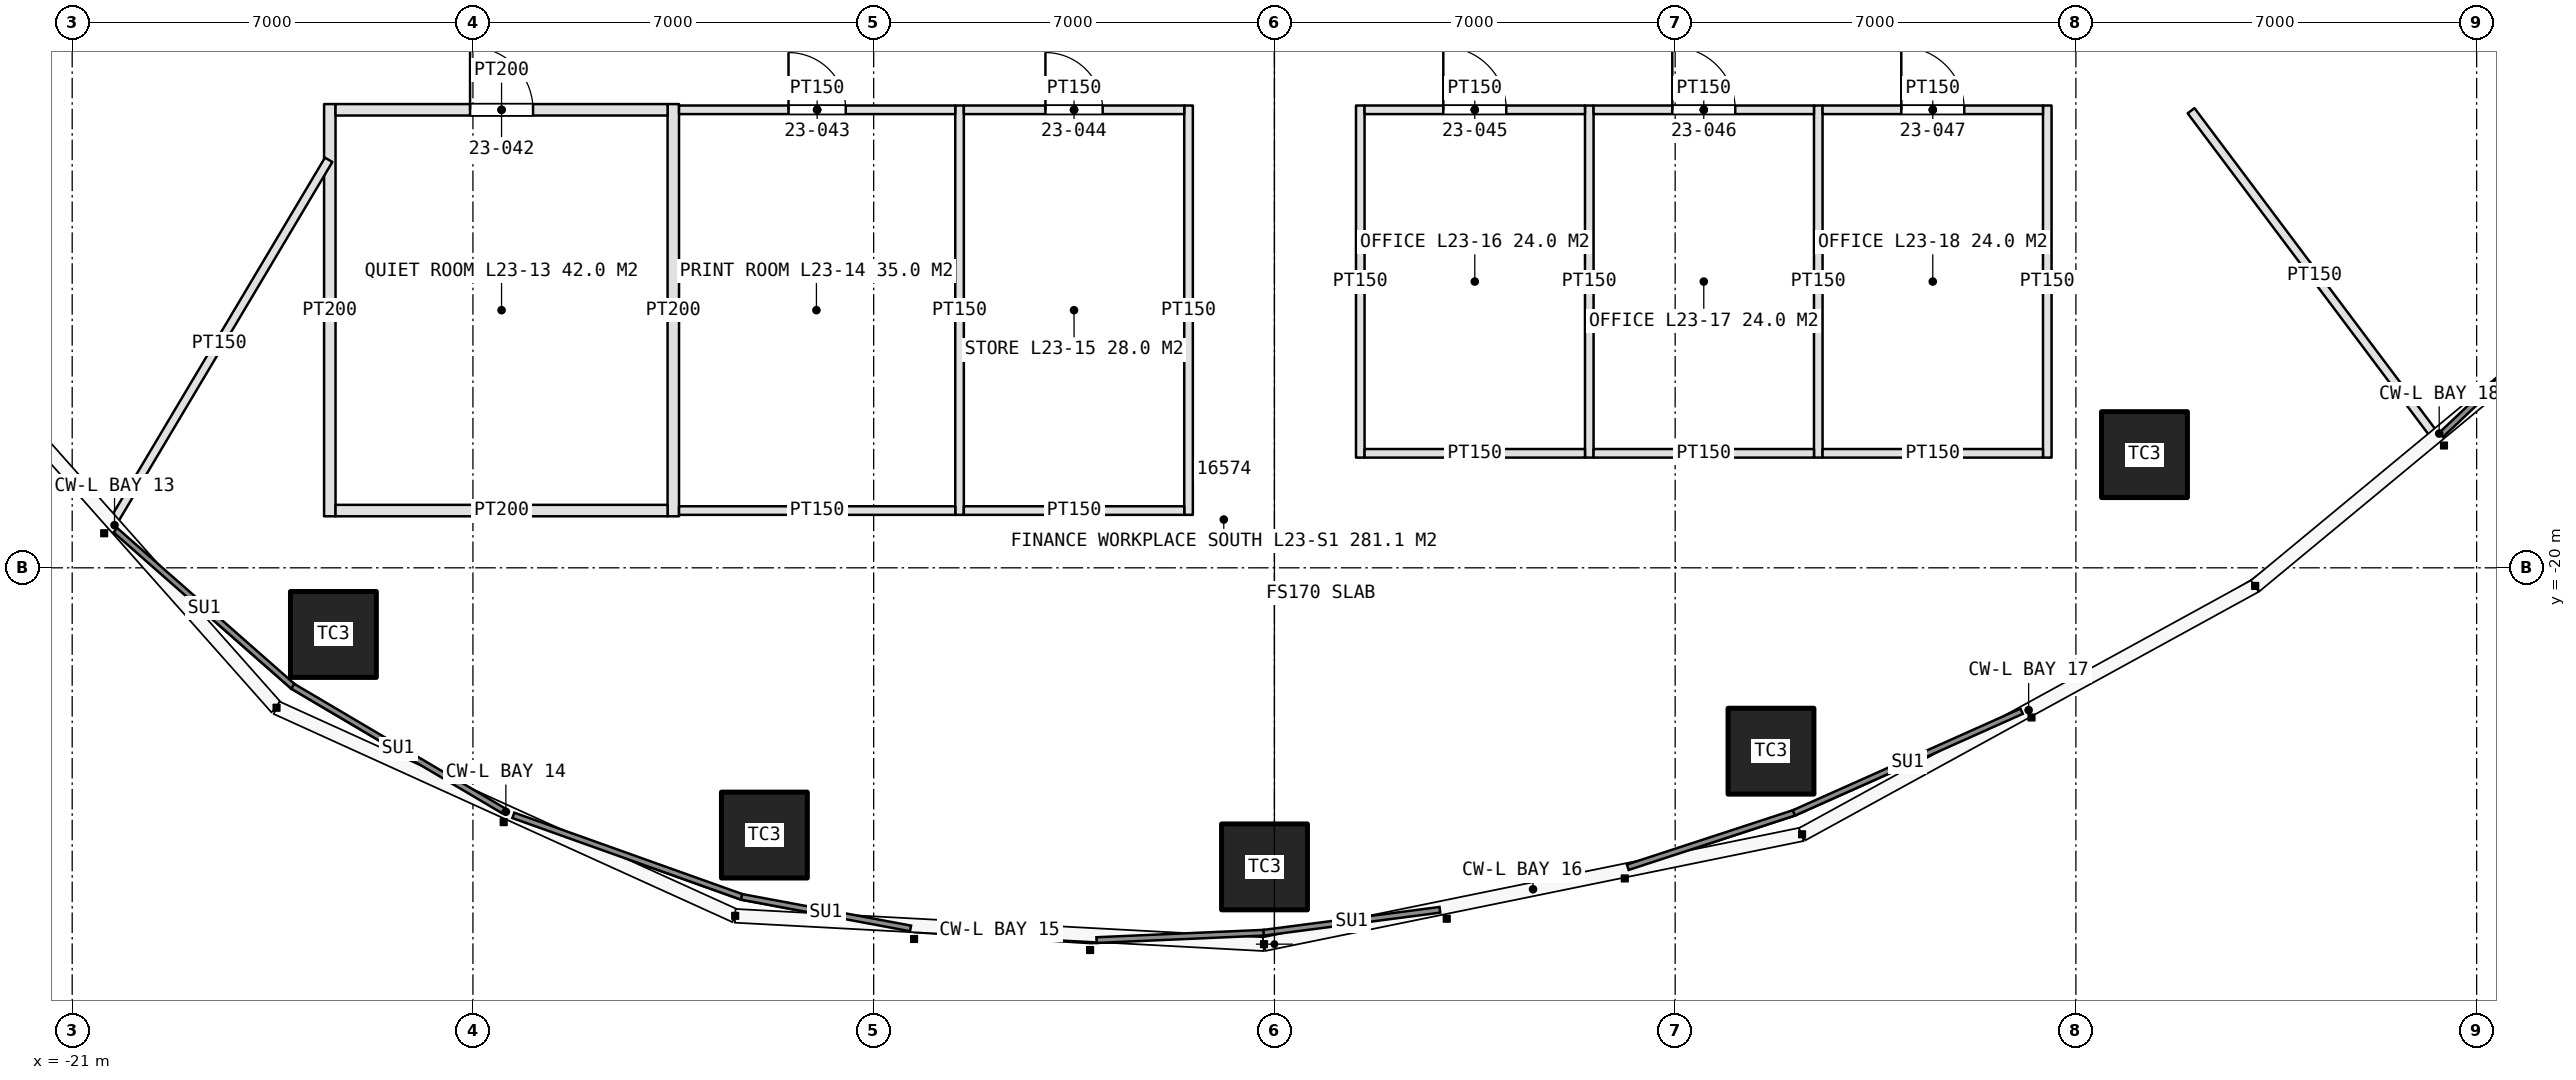
"""IFC4 building model, lengths in metres.
Left out: names, types, materials, properties, quantities, classifications, styles, units other than length and angle.
Written with IfcOpenShell. Run it as: python <this file> out.ifc"""

import sys

from ifc_helpers import new_model, si_unit, direction, frame, frame_2d, origin, origin_2d, place, context, subcontext, project, spatial, rectangle, extrude, element, fill, save


model = new_model("IFC4")
c1 = context("Model", 3, precision=1e-05, world=origin(), true_north=direction((0.0, 1.0)))
c2 = subcontext(c1, "Body", "Model", "MODEL_VIEW")
j1 = project(units=[si_unit("LENGTHUNIT", "METRE"), si_unit("PLANEANGLEUNIT", "RADIAN")], contexts=[c1])
p1 = place(None, origin())
s1 = spatial("IfcSite", under=j1, at=p1, CompositionType="ELEMENT")
p2 = place(p1, origin())
s2 = spatial("IfcBuilding", under=s1, at=p2, CompositionType="ELEMENT")
p3 = place(p2, frame((0.0, 0.0, 113.4)))
s3 = spatial("IfcBuildingStorey", under=s2, at=p3, CompositionType="ELEMENT", Elevation=113.4)
for number, where, z_axis, x_axis in (
    (1, (-16.437, -21.164, 0.0), (0.0, 0.0, 1.0), (1.0, 0.0, 0.0)),
    (2, (-8.909, -24.668, 0.0), (0.0, 0.0, 1.0), (1.0, 0.0, 0.0)),
    (3, (-0.173, -25.224, 0.0), (0.0, 0.0, 1.0), (1.0, 0.0, 0.0)),
    (4, (8.674, -23.203, 0.0), (0.0, 0.0, 1.0), (1.0, 0.0, 0.0)),
    (5, (15.198, -18.023, 0.0), (0.0, 0.0, 1.0), (1.0, 0.0, 0.0)),
):
    element("IfcColumn", number, at=place(p3, frame(where, z_axis=z_axis, x_axis=x_axis)), inside=s3, PredefinedType="COLUMN", context=c2, shape_type="SweptSolid", body=[
        extrude(rectangle(XDim=1.5, YDim=1.5, at=origin_2d()), origin(), (0.0, 0.0, 1.0), 4.2),
    ])
for number, where, z_axis, x_axis in (
    (6, (-16.5, -11.9, 0.0), (0.0, 0.0, 1.0), (0.0, -1.0, 0.0)),
    (7, (-10.5, -11.9, 0.0), (0.0, 0.0, 1.0), (0.0, -1.0, 0.0)),
):
    element("IfcWall", number, at=place(p3, frame(where, z_axis=z_axis, x_axis=x_axis)), inside=s3, PredefinedType="PARTITIONING", context=c2, shape_type="SweptSolid", body=[
        extrude(rectangle(XDim=7.2, YDim=0.2, at=frame_2d((3.6, 0.0))), origin(), (0.0, 0.0, 1.0), 3.0),
    ])
for number, where, z_axis, x_axis in (
    (8, (-5.5, -11.925, 0.0), (0.0, 0.0, 1.0), (0.0, -1.0, 0.0)),
    (9, (-1.5, -11.925, 0.0), (0.0, 0.0, 1.0), (0.0, -1.0, 0.0)),
):
    element("IfcWall", number, at=place(p3, frame(where, z_axis=z_axis, x_axis=x_axis)), inside=s3, PredefinedType="PARTITIONING", context=c2, shape_type="SweptSolid", body=[
        extrude(rectangle(XDim=7.15, YDim=0.15, at=frame_2d((3.575, 0.0))), origin(), (0.0, 0.0, 1.0), 3.0),
    ])
p4 = place(p3, frame((-16.4, -12.0, 0.0), z_axis=(0.0, 0.0, 1.0), x_axis=(1.0, 0.0, 0.0)))
e10 = element("IfcWall", 10, at=p4, inside=s3, PredefinedType="PARTITIONING", context=c2, shape_type="SweptSolid", body=[
    extrude(rectangle(XDim=5.8, YDim=0.2, at=frame_2d((2.9, 0.0))), origin(), (0.0, 0.0, 1.0), 3.0),
])
p5 = place(p4, frame((2.35, 0.0, 0.0)))
e11 = element("IfcOpeningElement", 11, at=p5, cuts=e10, PredefinedType="OPENING", context=c2, shape_type="SweptSolid", body=[
    extrude(rectangle(XDim=1.1, YDim=2.3, at=frame_2d((0.55, 1.15))), frame((0.0, 0.11, 0.0), z_axis=(0.0, -1.0, 0.0), x_axis=(1.0, 0.0, 0.0)), (0.0, 0.0, 1.0), 0.22),
])
p6 = place(p3, frame((-16.4, -19.0, 0.0), z_axis=(0.0, 0.0, 1.0), x_axis=(1.0, 0.0, 0.0)))
e12 = element("IfcWall", 12, at=p6, inside=s3, PredefinedType="PARTITIONING", context=c2, shape_type="SweptSolid", body=[
    extrude(rectangle(XDim=5.8, YDim=0.2, at=frame_2d((2.9, 0.0))), origin(), (0.0, 0.0, 1.0), 3.0),
])
p7 = place(p3, frame((-10.4, -12.0, 0.0), z_axis=(0.0, 0.0, 1.0), x_axis=(1.0, 0.0, 0.0)))
e13 = element("IfcWall", 13, at=p7, inside=s3, PredefinedType="PARTITIONING", context=c2, shape_type="SweptSolid", body=[
    extrude(rectangle(XDim=4.825, YDim=0.15, at=frame_2d((2.413, 0.0))), origin(), (0.0, 0.0, 1.0), 3.0),
])
p8 = place(p7, frame((1.913, 0.0, 0.0)))
e14 = element("IfcOpeningElement", 14, at=p8, cuts=e13, PredefinedType="OPENING", context=c2, shape_type="SweptSolid", body=[
    extrude(rectangle(XDim=1.0, YDim=2.2, at=frame_2d((0.5, 1.1))), frame((0.0, 0.085, 0.0), z_axis=(0.0, -1.0, 0.0), x_axis=(1.0, 0.0, 0.0)), (0.0, 0.0, 1.0), 0.17),
])
p9 = place(p3, frame((-10.4, -19.0, 0.0), z_axis=(0.0, 0.0, 1.0), x_axis=(1.0, 0.0, 0.0)))
e15 = element("IfcWall", 15, at=p9, inside=s3, PredefinedType="PARTITIONING", context=c2, shape_type="SweptSolid", body=[
    extrude(rectangle(XDim=4.825, YDim=0.15, at=frame_2d((2.413, 0.0))), origin(), (0.0, 0.0, 1.0), 3.0),
])
p10 = place(p3, frame((-5.425, -12.0, 0.0), z_axis=(0.0, 0.0, 1.0), x_axis=(1.0, 0.0, 0.0)))
e16 = element("IfcWall", 16, at=p10, inside=s3, PredefinedType="PARTITIONING", context=c2, shape_type="SweptSolid", body=[
    extrude(rectangle(XDim=3.85, YDim=0.15, at=frame_2d((1.925, 0.0))), origin(), (0.0, 0.0, 1.0), 3.0),
])
p11 = place(p10, frame((1.425, 0.0, 0.0)))
e17 = element("IfcOpeningElement", 17, at=p11, cuts=e16, PredefinedType="OPENING", context=c2, shape_type="SweptSolid", body=[
    extrude(rectangle(XDim=1.0, YDim=2.2, at=frame_2d((0.5, 1.1))), frame((0.0, 0.085, 0.0), z_axis=(0.0, -1.0, 0.0), x_axis=(1.0, 0.0, 0.0)), (0.0, 0.0, 1.0), 0.17),
])
p12 = place(p3, frame((-5.425, -19.0, 0.0), z_axis=(0.0, 0.0, 1.0), x_axis=(1.0, 0.0, 0.0)))
e18 = element("IfcWall", 18, at=p12, inside=s3, PredefinedType="PARTITIONING", context=c2, shape_type="SweptSolid", body=[
    extrude(rectangle(XDim=3.85, YDim=0.15, at=frame_2d((1.925, 0.0))), origin(), (0.0, 0.0, 1.0), 3.0),
])
for number, where, z_axis, x_axis in (
    (19, (1.5, -11.925, 0.0), (0.0, 0.0, 1.0), (0.0, -1.0, 0.0)),
    (20, (5.5, -11.925, 0.0), (0.0, 0.0, 1.0), (0.0, -1.0, 0.0)),
    (21, (9.5, -11.925, 0.0), (0.0, 0.0, 1.0), (0.0, -1.0, 0.0)),
    (22, (13.5, -11.925, 0.0), (0.0, 0.0, 1.0), (0.0, -1.0, 0.0)),
):
    element("IfcWall", number, at=place(p3, frame(where, z_axis=z_axis, x_axis=x_axis)), inside=s3, PredefinedType="PARTITIONING", context=c2, shape_type="SweptSolid", body=[
        extrude(rectangle(XDim=6.15, YDim=0.15, at=frame_2d((3.075, 0.0))), origin(), (0.0, 0.0, 1.0), 3.0),
    ])
p13 = place(p3, frame((1.575, -12.0, 0.0), z_axis=(0.0, 0.0, 1.0), x_axis=(1.0, 0.0, 0.0)))
e23 = element("IfcWall", 23, at=p13, inside=s3, PredefinedType="PARTITIONING", context=c2, shape_type="SweptSolid", body=[
    extrude(rectangle(XDim=3.85, YDim=0.15, at=frame_2d((1.925, 0.0))), origin(), (0.0, 0.0, 1.0), 3.0),
])
p14 = place(p13, frame((1.375, 0.0, 0.0)))
e24 = element("IfcOpeningElement", 24, at=p14, cuts=e23, PredefinedType="OPENING", context=c2, shape_type="SweptSolid", body=[
    extrude(rectangle(XDim=1.1, YDim=2.3, at=frame_2d((0.55, 1.15))), frame((0.0, 0.085, 0.0), z_axis=(0.0, -1.0, 0.0), x_axis=(1.0, 0.0, 0.0)), (0.0, 0.0, 1.0), 0.17),
])
p15 = place(p3, frame((1.575, -18.0, 0.0), z_axis=(0.0, 0.0, 1.0), x_axis=(1.0, 0.0, 0.0)))
e25 = element("IfcWall", 25, at=p15, inside=s3, PredefinedType="PARTITIONING", context=c2, shape_type="SweptSolid", body=[
    extrude(rectangle(XDim=3.85, YDim=0.15, at=frame_2d((1.925, 0.0))), origin(), (0.0, 0.0, 1.0), 3.0),
])
p16 = place(p3, frame((5.575, -12.0, 0.0), z_axis=(0.0, 0.0, 1.0), x_axis=(1.0, 0.0, 0.0)))
e26 = element("IfcWall", 26, at=p16, inside=s3, PredefinedType="PARTITIONING", context=c2, shape_type="SweptSolid", body=[
    extrude(rectangle(XDim=3.85, YDim=0.15, at=frame_2d((1.925, 0.0))), origin(), (0.0, 0.0, 1.0), 3.0),
])
p17 = place(p16, frame((1.375, 0.0, 0.0)))
e27 = element("IfcOpeningElement", 27, at=p17, cuts=e26, PredefinedType="OPENING", context=c2, shape_type="SweptSolid", body=[
    extrude(rectangle(XDim=1.1, YDim=2.3, at=frame_2d((0.55, 1.15))), frame((0.0, 0.085, 0.0), z_axis=(0.0, -1.0, 0.0), x_axis=(1.0, 0.0, 0.0)), (0.0, 0.0, 1.0), 0.17),
])
p18 = place(p3, frame((5.575, -18.0, 0.0), z_axis=(0.0, 0.0, 1.0), x_axis=(1.0, 0.0, 0.0)))
e28 = element("IfcWall", 28, at=p18, inside=s3, PredefinedType="PARTITIONING", context=c2, shape_type="SweptSolid", body=[
    extrude(rectangle(XDim=3.85, YDim=0.15, at=frame_2d((1.925, 0.0))), origin(), (0.0, 0.0, 1.0), 3.0),
])
p19 = place(p3, frame((9.575, -12.0, 0.0), z_axis=(0.0, 0.0, 1.0), x_axis=(1.0, 0.0, 0.0)))
e29 = element("IfcWall", 29, at=p19, inside=s3, PredefinedType="PARTITIONING", context=c2, shape_type="SweptSolid", body=[
    extrude(rectangle(XDim=3.85, YDim=0.15, at=frame_2d((1.925, 0.0))), origin(), (0.0, 0.0, 1.0), 3.0),
])
p20 = place(p19, frame((1.375, 0.0, 0.0)))
e30 = element("IfcOpeningElement", 30, at=p20, cuts=e29, PredefinedType="OPENING", context=c2, shape_type="SweptSolid", body=[
    extrude(rectangle(XDim=1.1, YDim=2.3, at=frame_2d((0.55, 1.15))), frame((0.0, 0.085, 0.0), z_axis=(0.0, -1.0, 0.0), x_axis=(1.0, 0.0, 0.0)), (0.0, 0.0, 1.0), 0.17),
])
p21 = place(p3, frame((9.575, -18.0, 0.0), z_axis=(0.0, 0.0, 1.0), x_axis=(1.0, 0.0, 0.0)))
e31 = element("IfcWall", 31, at=p21, inside=s3, PredefinedType="PARTITIONING", context=c2, shape_type="SweptSolid", body=[
    extrude(rectangle(XDim=3.85, YDim=0.15, at=frame_2d((1.925, 0.0))), origin(), (0.0, 0.0, 1.0), 3.0),
])
p22 = place(p3, frame((-16.52, -12.874, 0.0), z_axis=(0.0, 0.0, 1.0), x_axis=(-0.511514296511, -0.85927476657, 0.0)))
e32 = element("IfcWall", 32, at=p22, inside=s3, PredefinedType="PARTITIONING", context=c2, shape_type="SweptSolid", body=[
    extrude(rectangle(XDim=7.474, YDim=0.15, at=frame_2d((3.737, 0.0))), origin(), (0.0, 0.0, 1.0), 3.0),
])
p23 = place(p3, frame((16.012, -12.016, 0.0), z_axis=(0.0, 0.0, 1.0), x_axis=(0.600059749679, -0.799955184254, 0.0)))
e33 = element("IfcWall", 33, at=p23, inside=s3, PredefinedType="PARTITIONING", context=c2, shape_type="SweptSolid", body=[
    extrude(rectangle(XDim=7.191, YDim=0.15, at=frame_2d((3.596, 0.0))), origin(), (0.0, 0.0, 1.0), 3.0),
])
p24 = place(p5, origin())
e34 = element("IfcDoor", 34, at=p24, inside=s3, OperationType="SINGLE_SWING_LEFT", PredefinedType="DOOR", context=c2, shape_type="SweptSolid", body=[
    extrude(rectangle(XDim=1.1, YDim=2.3, at=frame_2d((0.55, 1.15))), frame((0.0, 0.025, 0.0), z_axis=(0.0, -1.0, 0.0), x_axis=(1.0, 0.0, 0.0)), (0.0, 0.0, 1.0), 0.05),
])
fill(e11, e34)
p25 = place(p8, origin())
e35 = element("IfcDoor", 35, at=p25, inside=s3, OperationType="SINGLE_SWING_LEFT", PredefinedType="DOOR", context=c2, shape_type="SweptSolid", body=[
    extrude(rectangle(XDim=1.0, YDim=2.2, at=frame_2d((0.5, 1.1))), frame((0.0, 0.025, 0.0), z_axis=(0.0, -1.0, 0.0), x_axis=(1.0, 0.0, 0.0)), (0.0, 0.0, 1.0), 0.05),
])
fill(e14, e35)
p26 = place(p11, origin())
e36 = element("IfcDoor", 36, at=p26, inside=s3, OperationType="SINGLE_SWING_LEFT", PredefinedType="DOOR", context=c2, shape_type="SweptSolid", body=[
    extrude(rectangle(XDim=1.0, YDim=2.2, at=frame_2d((0.5, 1.1))), frame((0.0, 0.025, 0.0), z_axis=(0.0, -1.0, 0.0), x_axis=(1.0, 0.0, 0.0)), (0.0, 0.0, 1.0), 0.05),
])
fill(e17, e36)
p27 = place(p14, origin())
e37 = element("IfcDoor", 37, at=p27, inside=s3, OperationType="SINGLE_SWING_LEFT", PredefinedType="DOOR", context=c2, shape_type="SweptSolid", body=[
    extrude(rectangle(XDim=1.1, YDim=2.3, at=frame_2d((0.55, 1.15))), frame((0.0, 0.025, 0.0), z_axis=(0.0, -1.0, 0.0), x_axis=(1.0, 0.0, 0.0)), (0.0, 0.0, 1.0), 0.05),
])
fill(e24, e37)
p28 = place(p17, origin())
e38 = element("IfcDoor", 38, at=p28, inside=s3, OperationType="SINGLE_SWING_LEFT", PredefinedType="DOOR", context=c2, shape_type="SweptSolid", body=[
    extrude(rectangle(XDim=1.1, YDim=2.3, at=frame_2d((0.55, 1.15))), frame((0.0, 0.025, 0.0), z_axis=(0.0, -1.0, 0.0), x_axis=(1.0, 0.0, 0.0)), (0.0, 0.0, 1.0), 0.05),
])
fill(e27, e38)
p29 = place(p20, origin())
e39 = element("IfcDoor", 39, at=p29, inside=s3, OperationType="SINGLE_SWING_LEFT", PredefinedType="DOOR", context=c2, shape_type="SweptSolid", body=[
    extrude(rectangle(XDim=1.1, YDim=2.3, at=frame_2d((0.55, 1.15))), frame((0.0, 0.025, 0.0), z_axis=(0.0, -1.0, 0.0), x_axis=(1.0, 0.0, 0.0)), (0.0, 0.0, 1.0), 0.05),
])
fill(e30, e39)
save(model, sys.argv[1])
